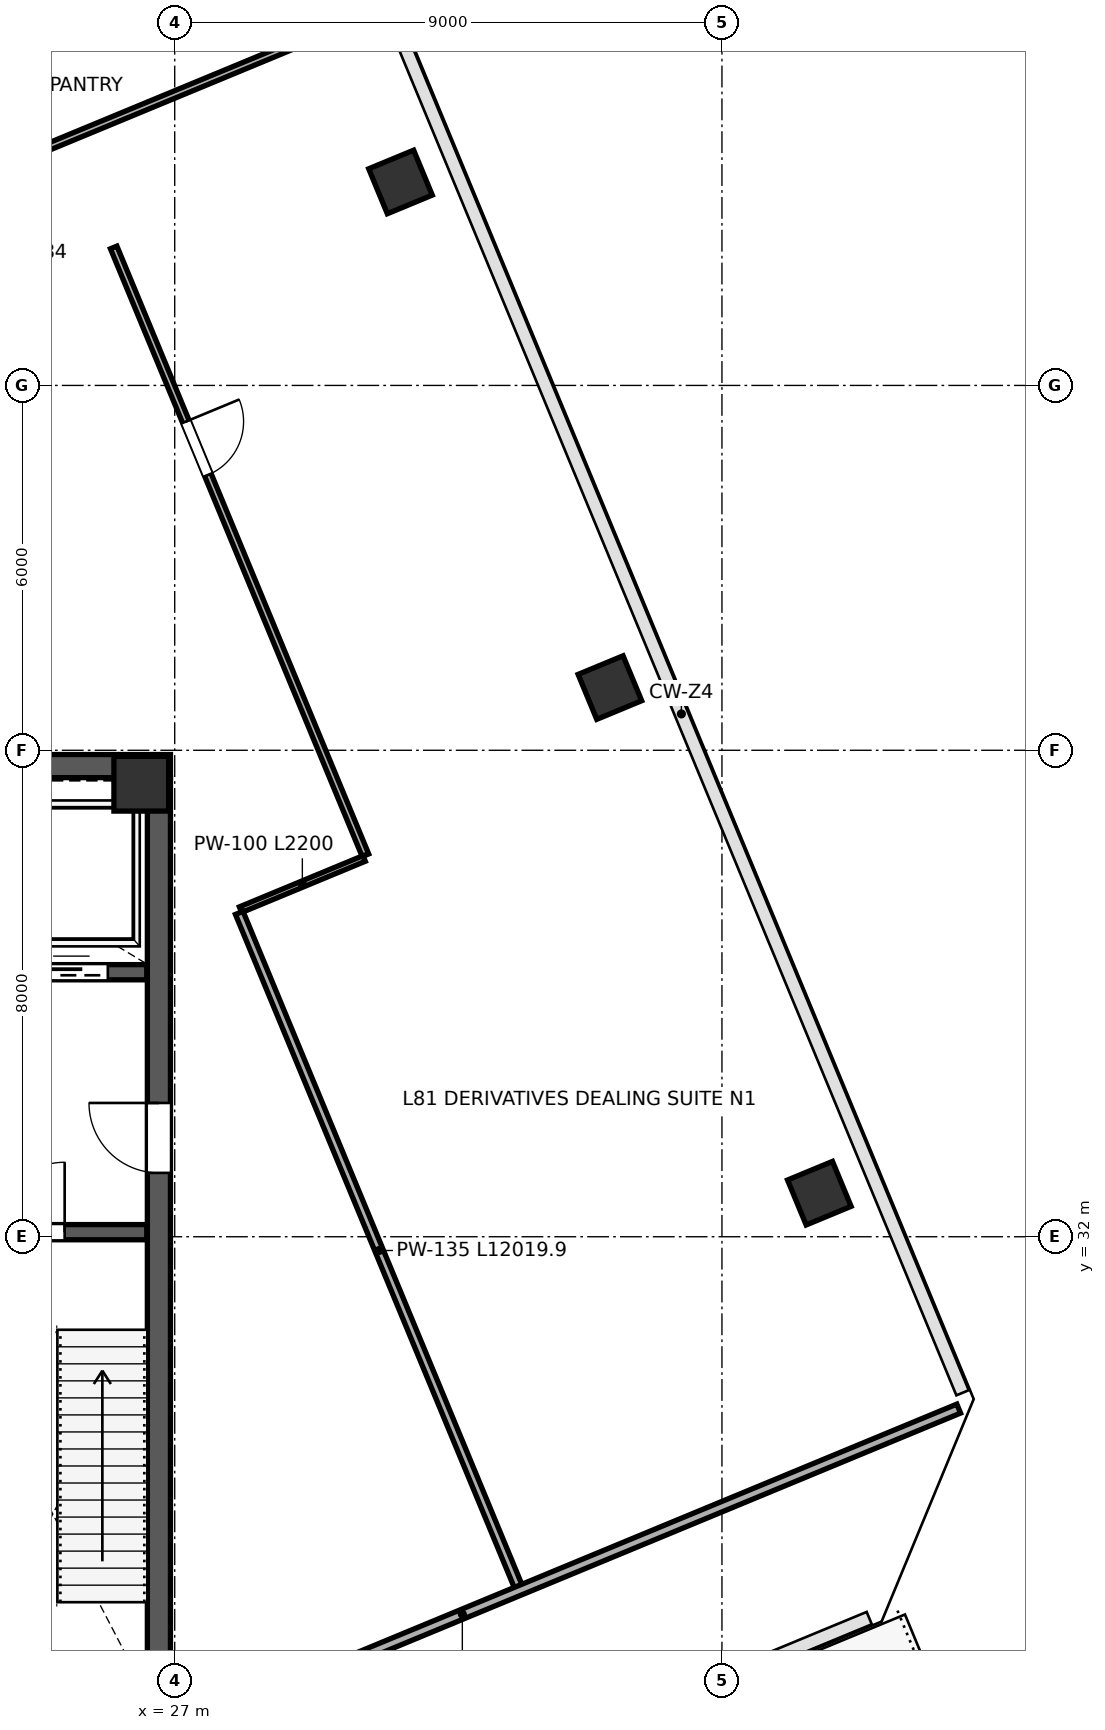
"""IFC4 building model, lengths in metres.
Left out: names, types, materials, properties, quantities, classifications, styles, units other than length and angle.
Written with IfcOpenShell. Run it as: python <this file> out.ifc"""

import sys

from ifc_helpers import new_model, si_unit, direction, frame, frame_2d, origin, origin_2d, place, context, subcontext, project, spatial, rectangle, extrude, source, transform, mapped, element, fill, save


model = new_model("IFC4")
c1 = context("Model", 3, precision=1e-05, world=origin(), true_north=direction((0.0, 1.0)))
c2 = subcontext(c1, "Body", "Model", "MODEL_VIEW")
j1 = project(units=[si_unit("LENGTHUNIT", "METRE"), si_unit("PLANEANGLEUNIT", "RADIAN")], contexts=[c1])
p1 = place(None, origin())
s1 = spatial("IfcSite", under=j1, at=p1, CompositionType="ELEMENT")
p2 = place(p1, origin())
s2 = spatial("IfcBuilding", under=s1, at=p2, CompositionType="ELEMENT")
p3 = place(p2, frame((0.0, 0.0, 360.0)))
s3 = spatial("IfcBuildingStorey", under=s2, at=p3, CompositionType="ELEMENT", Elevation=360.0)
m1 = source(origin(), c2, "Body", "SweptSolid", [
    extrude(rectangle(XDim=0.9, YDim=0.9, at=origin_2d()), origin(), (0.0, 0.0, 1.0), 5.999),
])
p4 = place(p3, frame((26.45, 39.45, 0.001), z_axis=(0.0, 0.0, 1.0), x_axis=(1.0, 0.0, 0.0)))
e1 = element("IfcColumn", 1, at=p4, inside=s3, PredefinedType="COLUMN", context=c2, shape_type="MappedRepresentation", body=[
    mapped(m1, transform((0.0, 0.0, 0.0), scale=1.0)),
])
m2 = source(origin(), c2, "Body", "SweptSolid", [
    extrude(rectangle(XDim=0.8, YDim=0.8, at=origin_2d()), origin(), (0.0, 0.0, 1.0), 5.699),
])
for number, where, z_axis, x_axis in (
    (2, (30.713, 49.346, 0.001), (0.0, 0.0, 1.0), (-0.383, 0.924, 0.0)),
    (3, (34.157, 41.031, 0.001), (0.0, 0.0, 1.0), (-0.383, 0.924, 0.0)),
    (4, (37.602, 32.716, 0.001), (0.0, 0.0, 1.0), (-0.383, 0.924, 0.0)),
):
    element("IfcColumn", number, at=place(p3, frame(where, z_axis=z_axis, x_axis=x_axis)), inside=s3, PredefinedType="COLUMN", context=c2, shape_type="MappedRepresentation", body=[
        mapped(m2, transform((0.0, 0.0, 0.0), scale=1.0)),
    ])
p5 = place(p3, frame((26.74, 24.45, 0.0), z_axis=(0.0, 0.0, 1.0), x_axis=(0.0, 1.0, 0.0)))
e5 = element("IfcWall", 5, at=p5, inside=s3, PredefinedType="SHEAR", context=c2, shape_type="SweptSolid", body=[
    extrude(rectangle(XDim=15.1, YDim=0.38, at=frame_2d((7.55, 0.0))), origin(), (0.0, 0.0, 1.0), 5.72),
])
p6 = place(p5, frame((8.6, 0.0, 0.0)))
e6 = element("IfcOpeningElement", 6, at=p6, cuts=e5, PredefinedType="OPENING", context=c2, shape_type="SweptSolid", body=[
    extrude(rectangle(XDim=1.15, YDim=2.2, at=frame_2d((0.575, 1.1))), frame((0.0, 0.2, 0.0), z_axis=(0.0, -1.0, 0.0), x_axis=(1.0, 0.0, 0.0)), (0.0, 0.0, 1.0), 0.4),
])
p7 = place(p3, frame((9.07, 39.74, 0.0), z_axis=(0.0, 0.0, 1.0), x_axis=(1.0, 0.0, 0.0)))
e7 = element("IfcWall", 7, at=p7, inside=s3, PredefinedType="SHEAR", context=c2, shape_type="SweptSolid", body=[
    extrude(rectangle(XDim=17.86, YDim=0.38, at=frame_2d((8.93, 0.0))), origin(), (0.0, 0.0, 1.0), 5.72),
])
p8 = place(p3, frame((23.19, 32.075, 0.0), z_axis=(0.0, 0.0, 1.0), x_axis=(1.0, 0.0, 0.0)))
e8 = element("IfcWall", 8, at=p8, inside=s3, PredefinedType="SHEAR", context=c2, shape_type="SweptSolid", body=[
    extrude(rectangle(XDim=3.35, YDim=0.25, at=frame_2d((1.675, 0.0))), origin(), (0.0, 0.0, 1.0), 5.72),
])
p9 = place(p8, frame((0.85, 0.0, 0.0)))
e9 = element("IfcOpeningElement", 9, at=p9, cuts=e8, PredefinedType="OPENING", context=c2, shape_type="SweptSolid", body=[
    extrude(rectangle(XDim=1.15, YDim=2.2, at=frame_2d((0.575, 1.1))), frame((0.0, 0.135, 0.0), z_axis=(0.0, -1.0, 0.0), x_axis=(1.0, 0.0, 0.0)), (0.0, 0.0, 1.0), 0.27),
])
p10 = place(p3, frame((21.45, 36.35, 0.0), z_axis=(0.0, 0.0, 1.0), x_axis=(1.0, 0.0, 0.0)))
e10 = element("IfcWall", 10, at=p10, inside=s3, PredefinedType="SHEAR", context=c2, shape_type="SweptSolid", body=[
    extrude(rectangle(XDim=5.09, YDim=0.25, at=frame_2d((2.545, 0.0))), origin(), (0.0, 0.0, 1.0), 5.72),
])
p11 = place(p10, frame((0.7, 0.0, 0.0)))
e11 = element("IfcOpeningElement", 11, at=p11, cuts=e10, PredefinedType="OPENING", context=c2, shape_type="SweptSolid", body=[
    extrude(rectangle(XDim=1.2, YDim=2.2, at=frame_2d((0.6, 1.1))), frame((0.0, 0.135, 0.0), z_axis=(0.0, -1.0, 0.0), x_axis=(1.0, 0.0, 0.0)), (0.0, 0.0, 1.0), 0.27),
])
p12 = place(p10, frame((3.25, 0.0, 0.0)))
e12 = element("IfcOpeningElement", 12, at=p12, cuts=e10, PredefinedType="OPENING", context=c2, shape_type="SweptSolid", body=[
    extrude(rectangle(XDim=1.2, YDim=2.2, at=frame_2d((0.6, 1.1))), frame((0.0, 0.135, 0.0), z_axis=(0.0, -1.0, 0.0), x_axis=(1.0, 0.0, 0.0)), (0.0, 0.0, 1.0), 0.27),
])
p13 = place(p3, frame((25.996, 48.269, 0.0), z_axis=(0.0, 0.0, 1.0), x_axis=(0.382683927115, -0.923879327579, 0.0)))
e13 = element("IfcWall", 13, at=p13, inside=s3, PredefinedType="PARTITIONING", context=c2, shape_type="SweptSolid", body=[
    extrude(rectangle(XDim=10.82, YDim=0.115, at=frame_2d((5.41, 0.0))), origin(), (0.0, 0.0, 1.0), 5.72),
])
p14 = place(p13, frame((3.1, 0.0, 0.0)))
e14 = element("IfcOpeningElement", 14, at=p14, cuts=e13, PredefinedType="OPENING", context=c2, shape_type="SweptSolid", body=[
    extrude(rectangle(XDim=0.95, YDim=2.15, at=frame_2d((0.475, 1.075))), frame((0.0, 0.067, 0.0), z_axis=(0.0, -1.0, 0.0), x_axis=(1.0, 0.0, 0.0)), (0.0, 0.0, 1.0), 0.135),
])
p15 = place(p3, frame((28.083, 37.378, 0.0), z_axis=(0.0, 0.0, 1.0), x_axis=(0.923853160736, 0.382747093259, 0.0)))
e15 = element("IfcWall", 15, at=p15, inside=s3, PredefinedType="PARTITIONING", context=c2, shape_type="SweptSolid", body=[
    extrude(rectangle(XDim=2.2, YDim=0.1, at=frame_2d((1.1, 0.0))), origin(), (0.0, 0.0, 1.0), 5.72),
])
p16 = place(p3, frame((28.061, 37.326, 0.0), z_axis=(0.0, 0.0, 1.0), x_axis=(0.382684852278, -0.923878944363, 0.0)))
e16 = element("IfcWall", 16, at=p16, inside=s3, PredefinedType="PARTITIONING", context=c2, shape_type="SweptSolid", body=[
    extrude(rectangle(XDim=12.02, YDim=0.135, at=frame_2d((6.01, 0.0))), origin(), (0.0, 0.0, 1.0), 5.72),
])
p17 = place(p3, frame((17.364, 46.793, 0.0), z_axis=(0.0, 0.0, 1.0), x_axis=(0.923874230192, 0.382696233045, 0.0)))
e17 = element("IfcWall", 17, at=p17, inside=s3, PredefinedType="PARTITIONING", context=c2, shape_type="SweptSolid", body=[
    extrude(rectangle(XDim=13.772, YDim=0.115, at=frame_2d((6.886, 0.0))), origin(), (0.0, 0.0, 1.0), 5.72),
])
p18 = place(p3, frame((23.567, 22.411, 0.0), z_axis=(0.0, 0.0, 1.0), x_axis=(0.923875223291, 0.382693835577, 0.0)))
e18 = element("IfcWall", 18, at=p18, inside=s3, PredefinedType="PARTITIONING", context=c2, shape_type="SweptSolid", body=[
    extrude(rectangle(XDim=17.672, YDim=0.16, at=frame_2d((8.836, 0.0))), origin(), (0.0, 0.0, 1.0), 5.72),
])
m3 = source(origin(), c2, "Body", "SweptSolid", [
    extrude(rectangle(XDim=1.15, YDim=2.2, at=frame_2d((0.575, 1.1))), frame((0.0, 0.025, 0.0), z_axis=(0.0, -1.0, 0.0), x_axis=(1.0, 0.0, 0.0)), (0.0, 0.0, 1.0), 0.05),
])
p19 = place(p9, origin())
e19 = element("IfcDoor", 19, at=p19, inside=s3, OperationType="SINGLE_SWING_RIGHT", PredefinedType="DOOR", context=c2, shape_type="MappedRepresentation", body=[
    mapped(m3, transform((0.0, 0.0, 0.0), scale=1.0)),
])
fill(e9, e19)
m4 = source(origin(), c2, "Body", "SweptSolid", [
    extrude(rectangle(XDim=1.15, YDim=2.2, at=frame_2d((0.575, 1.1))), frame((0.0, 0.025, 0.0), z_axis=(0.0, -1.0, 0.0), x_axis=(1.0, 0.0, 0.0)), (0.0, 0.0, 1.0), 0.05),
])
p20 = place(p6, origin())
e20 = element("IfcDoor", 20, at=p20, inside=s3, OperationType="SINGLE_SWING_RIGHT", PredefinedType="DOOR", context=c2, shape_type="MappedRepresentation", body=[
    mapped(m4, transform((0.0, 0.0, 0.0), scale=1.0)),
])
fill(e6, e20)
m5 = source(origin(), c2, "Body", "SweptSolid", [
    extrude(rectangle(XDim=1.2, YDim=2.2, at=frame_2d((0.6, 1.1))), frame((0.0, 0.025, 0.0), z_axis=(0.0, -1.0, 0.0), x_axis=(1.0, 0.0, 0.0)), (0.0, 0.0, 1.0), 0.05),
])
p21 = place(p12, origin())
e21 = element("IfcDoor", 21, at=p21, inside=s3, OperationType="SLIDING_TO_RIGHT", PredefinedType="DOOR", context=c2, shape_type="MappedRepresentation", body=[
    mapped(m5, transform((0.0, 0.0, 0.0), scale=1.0)),
])
fill(e12, e21)
m6 = source(origin(), c2, "Body", "SweptSolid", [
    extrude(rectangle(XDim=0.95, YDim=2.15, at=frame_2d((0.475, 1.075))), frame((0.0, 0.025, 0.0), z_axis=(0.0, -1.0, 0.0), x_axis=(1.0, 0.0, 0.0)), (0.0, 0.0, 1.0), 0.05),
])
p22 = place(p14, origin())
e22 = element("IfcDoor", 22, at=p22, inside=s3, OperationType="SINGLE_SWING_LEFT", PredefinedType="DOOR", context=c2, shape_type="MappedRepresentation", body=[
    mapped(m6, transform((0.0, 0.0, 0.0), scale=1.0)),
])
fill(e14, e22)
save(model, sys.argv[1])
